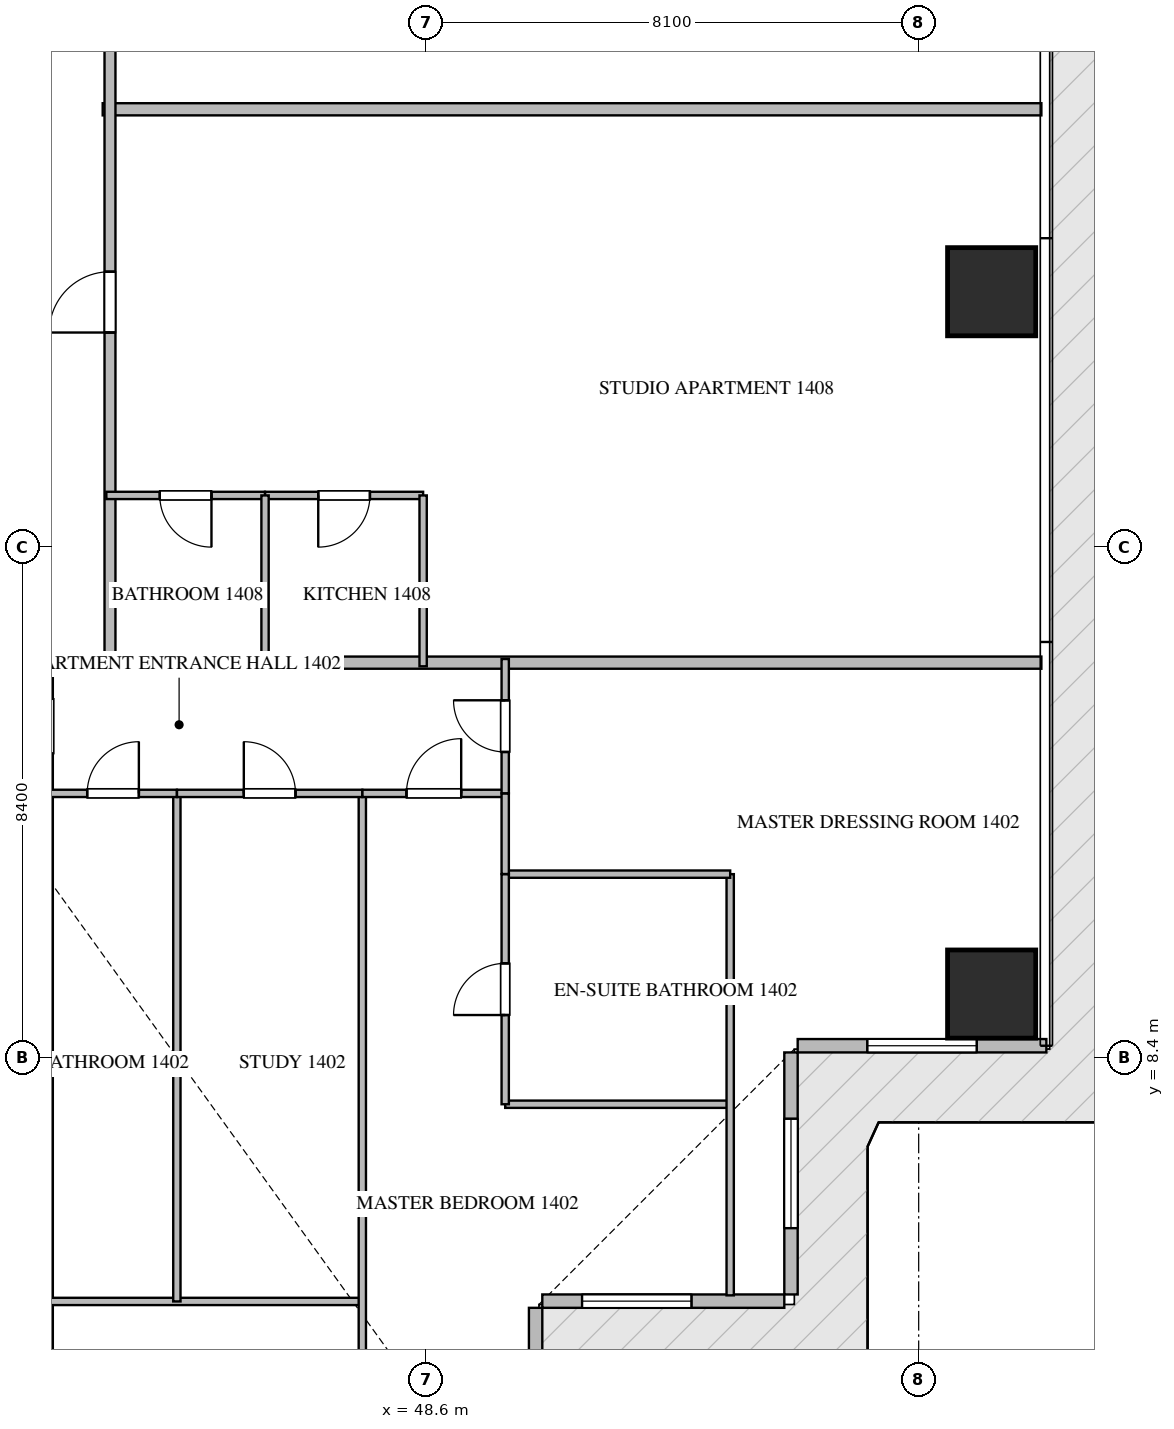
"""IFC4 building model, lengths in metres.
Left out: names, types, materials, properties, quantities, classifications, styles, units other than length and angle.
Written with IfcOpenShell. Run it as: python <this file> out.ifc"""

import sys

from ifc_helpers import new_model, si_unit, direction, frame, frame_2d, origin, origin_2d, place, context, subcontext, project, spatial, rectangle, extrude, source, transform, mapped, element, fill, save


model = new_model("IFC4")
c1 = context("Model", 3, precision=1e-05, world=origin(), true_north=direction((0.0, 1.0)))
c2 = subcontext(c1, "Body", "Model", "MODEL_VIEW")
j1 = project(units=[si_unit("LENGTHUNIT", "METRE"), si_unit("PLANEANGLEUNIT", "RADIAN")], contexts=[c1])
p1 = place(None, origin())
s1 = spatial("IfcSite", under=j1, at=p1, CompositionType="ELEMENT")
p2 = place(p1, origin())
s2 = spatial("IfcBuilding", under=s1, at=p2, CompositionType="ELEMENT")
p3 = place(p2, frame((0.0, 0.0, 60.45)))
s3 = spatial("IfcBuildingStorey", under=s2, at=p3, CompositionType="ELEMENT", Elevation=60.45)
m1 = source(origin(), c2, "Body", "SweptSolid", [
    extrude(rectangle(XDim=1.45, YDim=1.45, at=origin_2d()), origin(), (0.0, 0.0, 1.0), 3.75),
])
for number, where, z_axis, x_axis in (
    (1, (57.9, 9.45, -0.26), (0.0, 0.0, 1.0), (1.0, 0.0, 0.0)),
    (2, (57.9, 21.0, -0.26), (0.0, 0.0, 1.0), (1.0, 0.0, 0.0)),
):
    element("IfcColumn", number, at=place(p3, frame(where, z_axis=z_axis, x_axis=x_axis)), inside=s3, PredefinedType="COLUMN", context=c2, shape_type="MappedRepresentation", body=[
        mapped(m1, transform((0.0, 0.0, 0.0), scale=1.0)),
    ])
p4 = place(p3, frame((50.4, 0.2, 0.0), z_axis=(0.0, 0.0, 1.0), x_axis=(0.0, 1.0, 0.0)))
e3 = element("IfcWall", 3, at=p4, inside=s3, PredefinedType="ELEMENTEDWALL", context=c2, shape_type="SweptSolid", body=[
    extrude(rectangle(XDim=4.09, YDim=0.22, at=frame_2d((2.045, 0.0))), origin(), (0.0, 0.0, 1.0), 3.475),
])
p5 = place(p4, frame((1.145, 0.0, 0.65)))
e4 = element("IfcOpeningElement", 4, at=p5, cuts=e3, PredefinedType="OPENING", context=c2, shape_type="SweptSolid", body=[
    extrude(rectangle(XDim=1.8, YDim=2.1, at=frame_2d((0.9, 1.05))), frame((0.0, 0.12, 0.0), z_axis=(0.0, -1.0, 0.0), x_axis=(1.0, 0.0, 0.0)), (0.0, 0.0, 1.0), 0.24),
])
p6 = place(p3, frame((50.51, 4.4, 0.0), z_axis=(0.0, 0.0, 1.0), x_axis=(1.0, 0.0, 0.0)))
e5 = element("IfcWall", 5, at=p6, inside=s3, PredefinedType="ELEMENTEDWALL", context=c2, shape_type="SweptSolid", body=[
    extrude(rectangle(XDim=3.98, YDim=0.22, at=frame_2d((1.99, 0.0))), origin(), (0.0, 0.0, 1.0), 3.475),
])
p7 = place(p6, frame((0.654, 0.0, 0.65)))
e6 = element("IfcOpeningElement", 6, at=p7, cuts=e5, PredefinedType="OPENING", context=c2, shape_type="SweptSolid", body=[
    extrude(rectangle(XDim=1.8, YDim=2.1, at=frame_2d((0.9, 1.05))), frame((0.0, 0.12, 0.0), z_axis=(0.0, -1.0, 0.0), x_axis=(1.0, 0.0, 0.0)), (0.0, 0.0, 1.0), 0.24),
])
p8 = place(p3, frame((54.6, 4.51, 0.0), z_axis=(0.0, 0.0, 1.0), x_axis=(0.0, 1.0, 0.0)))
e7 = element("IfcWall", 7, at=p8, inside=s3, PredefinedType="ELEMENTEDWALL", context=c2, shape_type="SweptSolid", body=[
    extrude(rectangle(XDim=3.98, YDim=0.22, at=frame_2d((1.99, 0.0))), origin(), (0.0, 0.0, 1.0), 3.475),
])
p9 = place(p8, frame((1.09, 0.0, 0.65)))
e8 = element("IfcOpeningElement", 8, at=p9, cuts=e7, PredefinedType="OPENING", context=c2, shape_type="SweptSolid", body=[
    extrude(rectangle(XDim=1.8, YDim=2.1, at=frame_2d((0.9, 1.05))), frame((0.0, 0.12, 0.0), z_axis=(0.0, -1.0, 0.0), x_axis=(1.0, 0.0, 0.0)), (0.0, 0.0, 1.0), 0.24),
])
p10 = place(p3, frame((54.71, 8.6, 0.0), z_axis=(0.0, 0.0, 1.0), x_axis=(1.0, 0.0, 0.0)))
e9 = element("IfcWall", 9, at=p10, inside=s3, PredefinedType="ELEMENTEDWALL", context=c2, shape_type="SweptSolid", body=[
    extrude(rectangle(XDim=4.09, YDim=0.22, at=frame_2d((2.045, 0.0))), origin(), (0.0, 0.0, 1.0), 3.475),
])
p11 = place(p10, frame((1.145, 0.0, 0.65)))
e10 = element("IfcOpeningElement", 10, at=p11, cuts=e9, PredefinedType="OPENING", context=c2, shape_type="SweptSolid", body=[
    extrude(rectangle(XDim=1.8, YDim=2.1, at=frame_2d((0.9, 1.05))), frame((0.0, 0.12, 0.0), z_axis=(0.0, -1.0, 0.0), x_axis=(1.0, 0.0, 0.0)), (0.0, 0.0, 1.0), 0.24),
])
p12 = place(p3, frame((43.28, 24.0, 0.0), z_axis=(0.0, 0.0, 1.0), x_axis=(1.0, 0.0, 0.0)))
e11 = element("IfcWall", 11, at=p12, inside=s3, PredefinedType="PARTITIONING", context=c2, shape_type="SweptSolid", body=[
    extrude(rectangle(XDim=15.438, YDim=0.2, at=frame_2d((7.719, 0.0))), origin(), (0.0, 0.0, 1.0), 3.49),
])
p13 = place(p3, frame((43.4, 14.9, 0.0), z_axis=(0.0, 0.0, 1.0), x_axis=(1.0, 0.0, 0.0)))
e12 = element("IfcWall", 12, at=p13, inside=s3, PredefinedType="PARTITIONING", context=c2, shape_type="SweptSolid", body=[
    extrude(rectangle(XDim=15.318, YDim=0.2, at=frame_2d((7.659, 0.0))), origin(), (0.0, 0.0, 1.0), 3.49),
])
p14 = place(p3, frame((21.402, 14.9, 0.0), z_axis=(0.0, 0.0, 1.0), x_axis=(1.0, 0.0, 0.0)))
e13 = element("IfcWall", 13, at=p14, inside=s3, PredefinedType="PARTITIONING", context=c2, shape_type="SweptSolid", body=[
    extrude(rectangle(XDim=21.996, YDim=0.18, at=frame_2d((10.998, 0.0))), origin(), (0.0, 0.0, 1.0), 3.49),
])
p15 = place(p14, frame((9.742, 0.0, 0.0)))
e14 = element("IfcOpeningElement", 14, at=p15, cuts=e13, PredefinedType="OPENING", context=c2, shape_type="SweptSolid", body=[
    extrude(rectangle(XDim=1.0, YDim=2.15, at=frame_2d((0.5, 1.075))), frame((0.0, 0.1, 0.0), z_axis=(0.0, -1.0, 0.0), x_axis=(1.0, 0.0, 0.0)), (0.0, 0.0, 1.0), 0.2),
])
p16 = place(p14, frame((14.781, 0.0, 0.0)))
e15 = element("IfcOpeningElement", 15, at=p16, cuts=e13, PredefinedType="OPENING", context=c2, shape_type="SweptSolid", body=[
    extrude(rectangle(XDim=1.0, YDim=2.15, at=frame_2d((0.5, 1.075))), frame((0.0, 0.1, 0.0), z_axis=(0.0, -1.0, 0.0), x_axis=(1.0, 0.0, 0.0)), (0.0, 0.0, 1.0), 0.2),
])
p17 = place(p3, frame((43.4, 14.9, 0.0), z_axis=(0.0, 0.0, 1.0), x_axis=(0.0, 1.0, 0.0)))
e16 = element("IfcWall", 16, at=p17, inside=s3, PredefinedType="PARTITIONING", context=c2, shape_type="SweptSolid", body=[
    extrude(rectangle(XDim=20.6, YDim=0.18, at=frame_2d((10.3, 0.0))), origin(), (0.0, 0.0, 1.0), 3.49),
])
p18 = place(p17, frame((5.429, 0.0, 0.0)))
e17 = element("IfcOpeningElement", 17, at=p18, cuts=e16, PredefinedType="OPENING", context=c2, shape_type="SweptSolid", body=[
    extrude(rectangle(XDim=1.0, YDim=2.15, at=frame_2d((0.5, 1.075))), frame((0.0, 0.1, 0.0), z_axis=(0.0, -1.0, 0.0), x_axis=(1.0, 0.0, 0.0)), (0.0, 0.0, 1.0), 0.2),
])
p19 = place(p17, frame((10.506, 0.0, 0.0)))
e18 = element("IfcOpeningElement", 18, at=p19, cuts=e16, PredefinedType="OPENING", context=c2, shape_type="SweptSolid", body=[
    extrude(rectangle(XDim=1.0, YDim=2.15, at=frame_2d((0.5, 1.075))), frame((0.0, 0.1, 0.0), z_axis=(0.0, -1.0, 0.0), x_axis=(1.0, 0.0, 0.0)), (0.0, 0.0, 1.0), 0.2),
])
p20 = place(p3, frame((42.4, 12.75, 0.0), z_axis=(0.0, 0.0, 1.0), x_axis=(0.0, 1.0, 0.0)))
e19 = element("IfcWall", 19, at=p20, inside=s3, PredefinedType="PARTITIONING", context=c2, shape_type="SweptSolid", body=[
    extrude(rectangle(XDim=2.21, YDim=0.12, at=frame_2d((1.105, 0.0))), origin(), (0.0, 0.0, 1.0), 3.49),
])
p21 = place(p20, frame((0.655, 0.0, 0.0)))
e20 = element("IfcOpeningElement", 20, at=p21, cuts=e19, PredefinedType="OPENING", context=c2, shape_type="SweptSolid", body=[
    extrude(rectangle(XDim=0.9, YDim=2.1, at=frame_2d((0.45, 1.05))), frame((0.0, 0.07, 0.0), z_axis=(0.0, -1.0, 0.0), x_axis=(1.0, 0.0, 0.0)), (0.0, 0.0, 1.0), 0.14),
])
p22 = place(p3, frame((42.4, 0.295, 0.0), z_axis=(0.0, 0.0, 1.0), x_axis=(0.0, 1.0, 0.0)))
e21 = element("IfcWall", 21, at=p22, inside=s3, PredefinedType="PARTITIONING", context=c2, shape_type="SweptSolid", body=[
    extrude(rectangle(XDim=4.1, YDim=0.12, at=frame_2d((2.05, 0.0))), origin(), (0.0, 0.0, 1.0), 3.49),
])
p23 = place(p22, frame((1.76, 0.0, 0.0)))
e22 = element("IfcOpeningElement", 22, at=p23, cuts=e21, PredefinedType="OPENING", context=c2, shape_type="SweptSolid", body=[
    extrude(rectangle(XDim=0.9, YDim=2.1, at=frame_2d((0.45, 1.05))), frame((0.0, 0.07, 0.0), z_axis=(0.0, -1.0, 0.0), x_axis=(1.0, 0.0, 0.0)), (0.0, 0.0, 1.0), 0.14),
])
p24 = place(p3, frame((42.4, 4.397, 0.0), z_axis=(0.0, 0.0, 1.0), x_axis=(0.0, 1.0, 0.0)))
e23 = element("IfcWall", 23, at=p24, inside=s3, PredefinedType="PARTITIONING", context=c2, shape_type="SweptSolid", body=[
    extrude(rectangle(XDim=8.351, YDim=0.12, at=frame_2d((4.176, 0.0))), origin(), (0.0, 0.0, 1.0), 3.49),
])
p25 = place(p3, frame((42.4, 4.395, 0.0), z_axis=(0.0, 0.0, 1.0), x_axis=(1.0, 0.0, 0.0)))
e24 = element("IfcWall", 24, at=p25, inside=s3, PredefinedType="PARTITIONING", context=c2, shape_type="SweptSolid", body=[
    extrude(rectangle(XDim=5.15, YDim=0.12, at=frame_2d((2.575, 0.0))), origin(), (0.0, 0.0, 1.0), 3.49),
])
p26 = place(p3, frame((47.55, 0.295, 0.0), z_axis=(0.0, 0.0, 1.0), x_axis=(0.0, 1.0, 0.0)))
e25 = element("IfcWall", 25, at=p26, inside=s3, PredefinedType="PARTITIONING", context=c2, shape_type="SweptSolid", body=[
    extrude(rectangle(XDim=12.455, YDim=0.12, at=frame_2d((6.228, 0.0))), origin(), (0.0, 0.0, 1.0), 3.49),
])
p27 = place(p3, frame((44.5, 4.395, 0.0), z_axis=(0.0, 0.0, 1.0), x_axis=(0.0, 1.0, 0.0)))
e26 = element("IfcWall", 26, at=p27, inside=s3, PredefinedType="PARTITIONING", context=c2, shape_type="SweptSolid", body=[
    extrude(rectangle(XDim=8.355, YDim=0.12, at=frame_2d((4.177, 0.0))), origin(), (0.0, 0.0, 1.0), 3.49),
])
p28 = place(p3, frame((42.4, 12.75, 0.0), z_axis=(0.0, 0.0, 1.0), x_axis=(1.0, 0.0, 0.0)))
e27 = element("IfcWall", 27, at=p28, inside=s3, PredefinedType="PARTITIONING", context=c2, shape_type="SweptSolid", body=[
    extrude(rectangle(XDim=2.1, YDim=0.12, at=frame_2d((1.05, 0.0))), origin(), (0.0, 0.0, 1.0), 3.49),
])
p29 = place(p28, frame((0.625, 0.0, 0.0)))
e28 = element("IfcOpeningElement", 28, at=p29, cuts=e27, PredefinedType="OPENING", context=c2, shape_type="SweptSolid", body=[
    extrude(rectangle(XDim=0.85, YDim=2.1, at=frame_2d((0.425, 1.05))), frame((0.0, 0.07, 0.0), z_axis=(0.0, -1.0, 0.0), x_axis=(1.0, 0.0, 0.0)), (0.0, 0.0, 1.0), 0.14),
])
p30 = place(p3, frame((44.502, 12.75, 0.0), z_axis=(0.0, 0.0, 1.0), x_axis=(1.0, 0.0, 0.0)))
e29 = element("IfcWall", 29, at=p30, inside=s3, PredefinedType="PARTITIONING", context=c2, shape_type="SweptSolid", body=[
    extrude(rectangle(XDim=3.048, YDim=0.12, at=frame_2d((1.524, 0.0))), origin(), (0.0, 0.0, 1.0), 3.49),
])
p31 = place(p30, frame((1.099, 0.0, 0.0)))
e30 = element("IfcOpeningElement", 30, at=p31, cuts=e29, PredefinedType="OPENING", context=c2, shape_type="SweptSolid", body=[
    extrude(rectangle(XDim=0.85, YDim=2.1, at=frame_2d((0.425, 1.05))), frame((0.0, 0.07, 0.0), z_axis=(0.0, -1.0, 0.0), x_axis=(1.0, 0.0, 0.0)), (0.0, 0.0, 1.0), 0.14),
])
p32 = place(p3, frame((47.552, 12.75, 0.0), z_axis=(0.0, 0.0, 1.0), x_axis=(1.0, 0.0, 0.0)))
e31 = element("IfcWall", 31, at=p32, inside=s3, PredefinedType="PARTITIONING", context=c2, shape_type="SweptSolid", body=[
    extrude(rectangle(XDim=2.348, YDim=0.12, at=frame_2d((1.174, 0.0))), origin(), (0.0, 0.0, 1.0), 3.49),
])
p33 = place(p32, frame((0.724, 0.0, 0.0)))
e32 = element("IfcOpeningElement", 32, at=p33, cuts=e31, PredefinedType="OPENING", context=c2, shape_type="SweptSolid", body=[
    extrude(rectangle(XDim=0.9, YDim=2.1, at=frame_2d((0.45, 1.05))), frame((0.0, 0.07, 0.0), z_axis=(0.0, -1.0, 0.0), x_axis=(1.0, 0.0, 0.0)), (0.0, 0.0, 1.0), 0.14),
])
p34 = place(p3, frame((49.9, 7.638, 0.0), z_axis=(0.0, 0.0, 1.0), x_axis=(1.0, 0.0, 0.0)))
e33 = element("IfcWall", 33, at=p34, inside=s3, PredefinedType="PARTITIONING", context=c2, shape_type="SweptSolid", body=[
    extrude(rectangle(XDim=3.7, YDim=0.12, at=frame_2d((1.85, 0.0))), origin(), (0.0, 0.0, 1.0), 3.49),
])
p35 = place(p3, frame((53.6, 4.495, 0.0), z_axis=(0.0, 0.0, 1.0), x_axis=(0.0, 1.0, 0.0)))
e34 = element("IfcWall", 34, at=p35, inside=s3, PredefinedType="PARTITIONING", context=c2, shape_type="SweptSolid", body=[
    extrude(rectangle(XDim=6.927, YDim=0.12, at=frame_2d((3.463, 0.0))), origin(), (0.0, 0.0, 1.0), 3.49),
])
p36 = place(p3, frame((49.9, 11.422, 0.0), z_axis=(0.0, 0.0, 1.0), x_axis=(1.0, 0.0, 0.0)))
e35 = element("IfcWall", 35, at=p36, inside=s3, PredefinedType="PARTITIONING", context=c2, shape_type="SweptSolid", body=[
    extrude(rectangle(XDim=3.7, YDim=0.12, at=frame_2d((1.85, 0.0))), origin(), (0.0, 0.0, 1.0), 3.49),
])
p37 = place(p3, frame((49.9, 7.638, 0.0), z_axis=(0.0, 0.0, 1.0), x_axis=(0.0, 1.0, 0.0)))
e36 = element("IfcWall", 36, at=p37, inside=s3, PredefinedType="PARTITIONING", context=c2, shape_type="SweptSolid", body=[
    extrude(rectangle(XDim=3.784, YDim=0.12, at=frame_2d((1.892, 0.0))), origin(), (0.0, 0.0, 1.0), 3.49),
])
p38 = place(p37, frame((1.467, 0.0, 0.0)))
e37 = element("IfcOpeningElement", 37, at=p38, cuts=e36, PredefinedType="OPENING", context=c2, shape_type="SweptSolid", body=[
    extrude(rectangle(XDim=0.85, YDim=2.1, at=frame_2d((0.425, 1.05))), frame((0.0, 0.07, 0.0), z_axis=(0.0, -1.0, 0.0), x_axis=(1.0, 0.0, 0.0)), (0.0, 0.0, 1.0), 0.14),
])
p39 = place(p3, frame((49.9, 11.424, 0.0), z_axis=(0.0, 0.0, 1.0), x_axis=(0.0, 1.0, 0.0)))
e38 = element("IfcWall", 38, at=p39, inside=s3, PredefinedType="PARTITIONING", context=c2, shape_type="SweptSolid", body=[
    extrude(rectangle(XDim=1.326, YDim=0.12, at=frame_2d((0.663, 0.0))), origin(), (0.0, 0.0, 1.0), 3.49),
])
p40 = place(p3, frame((49.9, 12.752, 0.0), z_axis=(0.0, 0.0, 1.0), x_axis=(0.0, 1.0, 0.0)))
e39 = element("IfcWall", 39, at=p40, inside=s3, PredefinedType="PARTITIONING", context=c2, shape_type="SweptSolid", body=[
    extrude(rectangle(XDim=2.208, YDim=0.12, at=frame_2d((1.104, 0.0))), origin(), (0.0, 0.0, 1.0), 3.49),
])
p41 = place(p40, frame((0.679, 0.0, 0.0)))
e40 = element("IfcOpeningElement", 40, at=p41, cuts=e39, PredefinedType="OPENING", context=c2, shape_type="SweptSolid", body=[
    extrude(rectangle(XDim=0.85, YDim=2.1, at=frame_2d((0.425, 1.05))), frame((0.0, 0.07, 0.0), z_axis=(0.0, -1.0, 0.0), x_axis=(1.0, 0.0, 0.0)), (0.0, 0.0, 1.0), 0.14),
])
p42 = place(p3, frame((48.55, 17.65, 0.0), z_axis=(0.0, 0.0, 1.0), x_axis=(-1.0, 0.0, 0.0)))
e41 = element("IfcWall", 41, at=p42, inside=s3, PredefinedType="PARTITIONING", context=c2, shape_type="SweptSolid", body=[
    extrude(rectangle(XDim=2.6, YDim=0.12, at=frame_2d((1.3, 0.0))), origin(), (0.0, 0.0, 1.0), 3.49),
])
p43 = place(p42, frame((0.875, 0.0, 0.0)))
e42 = element("IfcOpeningElement", 42, at=p43, cuts=e41, PredefinedType="OPENING", context=c2, shape_type="SweptSolid", body=[
    extrude(rectangle(XDim=0.85, YDim=2.1, at=frame_2d((0.425, 1.05))), frame((0.0, 0.07, 0.0), z_axis=(0.0, -1.0, 0.0), x_axis=(1.0, 0.0, 0.0)), (0.0, 0.0, 1.0), 0.14),
])
p44 = place(p3, frame((45.948, 17.65, 0.0), z_axis=(0.0, 0.0, 1.0), x_axis=(-1.0, 0.0, 0.0)))
e43 = element("IfcWall", 43, at=p44, inside=s3, PredefinedType="PARTITIONING", context=c2, shape_type="SweptSolid", body=[
    extrude(rectangle(XDim=2.608, YDim=0.12, at=frame_2d((1.304, 0.0))), origin(), (0.0, 0.0, 1.0), 3.49),
])
p45 = place(p44, frame((0.879, 0.0, 0.0)))
e44 = element("IfcOpeningElement", 44, at=p45, cuts=e43, PredefinedType="OPENING", context=c2, shape_type="SweptSolid", body=[
    extrude(rectangle(XDim=0.85, YDim=2.1, at=frame_2d((0.425, 1.05))), frame((0.0, 0.07, 0.0), z_axis=(0.0, -1.0, 0.0), x_axis=(1.0, 0.0, 0.0)), (0.0, 0.0, 1.0), 0.14),
])
for number, where, z_axis, x_axis in (
    (45, (45.95, 14.84, 0.0), (0.0, 0.0, 1.0), (0.0, 1.0, 0.0)),
    (46, (48.55, 14.84, 0.0), (0.0, 0.0, 1.0), (0.0, 1.0, 0.0)),
):
    element("IfcWall", number, at=place(p3, frame(where, z_axis=z_axis, x_axis=x_axis)), inside=s3, PredefinedType="PARTITIONING", context=c2, shape_type="SweptSolid", body=[
        extrude(rectangle(XDim=2.81, YDim=0.12, at=frame_2d((1.405, 0.0))), origin(), (0.0, 0.0, 1.0), 3.49),
    ])
m2 = source(origin(), c2, "Body", "SweptSolid", [
    extrude(rectangle(XDim=1.8, YDim=2.1, at=frame_2d((0.9, 1.05))), frame((0.0, 0.03, 0.0), z_axis=(0.0, -1.0, 0.0), x_axis=(1.0, 0.0, 0.0)), (0.0, 0.0, 1.0), 0.06),
])
p46 = place(p7, origin())
e47 = element("IfcWindow", 47, at=p46, inside=s3, PartitioningType="SINGLE_PANEL", PredefinedType="WINDOW", context=c2, shape_type="MappedRepresentation", body=[
    mapped(m2, transform((0.0, 0.0, 0.0), scale=1.0)),
])
fill(e6, e47)
p47 = place(p9, origin())
e48 = element("IfcWindow", 48, at=p47, inside=s3, PartitioningType="SINGLE_PANEL", PredefinedType="WINDOW", context=c2, shape_type="MappedRepresentation", body=[
    mapped(m2, transform((0.0, 0.0, 0.0), scale=1.0)),
])
fill(e8, e48)
p48 = place(p11, origin())
e49 = element("IfcWindow", 49, at=p48, inside=s3, PartitioningType="SINGLE_PANEL", PredefinedType="WINDOW", context=c2, shape_type="MappedRepresentation", body=[
    mapped(m2, transform((0.0, 0.0, 0.0), scale=1.0)),
])
fill(e10, e49)
m3 = source(origin(), c2, "Body", "SweptSolid", [
    extrude(rectangle(XDim=1.0, YDim=2.15, at=frame_2d((0.5, 1.075))), frame((0.0, 0.025, 0.0), z_axis=(0.0, -1.0, 0.0), x_axis=(1.0, 0.0, 0.0)), (0.0, 0.0, 1.0), 0.05),
])
p49 = place(p18, origin())
e50 = element("IfcDoor", 50, at=p49, inside=s3, OperationType="SINGLE_SWING_LEFT", PredefinedType="DOOR", context=c2, shape_type="MappedRepresentation", body=[
    mapped(m3, transform((0.0, 0.0, 0.0), scale=1.0)),
])
fill(e17, e50)
m4 = source(origin(), c2, "Body", "SweptSolid", [
    extrude(rectangle(XDim=0.85, YDim=2.1, at=frame_2d((0.425, 1.05))), frame((0.0, 0.025, 0.0), z_axis=(0.0, -1.0, 0.0), x_axis=(1.0, 0.0, 0.0)), (0.0, 0.0, 1.0), 0.05),
])
p50 = place(p29, origin())
e51 = element("IfcDoor", 51, at=p50, inside=s3, OperationType="SINGLE_SWING_RIGHT", PredefinedType="DOOR", context=c2, shape_type="MappedRepresentation", body=[
    mapped(m4, transform((0.0, 0.0, 0.0), scale=1.0)),
])
fill(e28, e51)
p51 = place(p31, origin())
e52 = element("IfcDoor", 52, at=p51, inside=s3, OperationType="SINGLE_SWING_LEFT", PredefinedType="DOOR", context=c2, shape_type="MappedRepresentation", body=[
    mapped(m4, transform((0.0, 0.0, 0.0), scale=1.0)),
])
fill(e30, e52)
m5 = source(origin(), c2, "Body", "SweptSolid", [
    extrude(rectangle(XDim=0.9, YDim=2.1, at=frame_2d((0.45, 1.05))), frame((0.0, 0.025, 0.0), z_axis=(0.0, -1.0, 0.0), x_axis=(1.0, 0.0, 0.0)), (0.0, 0.0, 1.0), 0.05),
])
p52 = place(p33, origin())
e53 = element("IfcDoor", 53, at=p52, inside=s3, OperationType="SINGLE_SWING_RIGHT", PredefinedType="DOOR", context=c2, shape_type="MappedRepresentation", body=[
    mapped(m5, transform((0.0, 0.0, 0.0), scale=1.0)),
])
fill(e32, e53)
p53 = place(p38, origin())
e54 = element("IfcDoor", 54, at=p53, inside=s3, OperationType="SINGLE_SWING_LEFT", PredefinedType="DOOR", context=c2, shape_type="MappedRepresentation", body=[
    mapped(m4, transform((0.0, 0.0, 0.0), scale=1.0)),
])
fill(e37, e54)
p54 = place(p41, origin())
e55 = element("IfcDoor", 55, at=p54, inside=s3, OperationType="SINGLE_SWING_RIGHT", PredefinedType="DOOR", context=c2, shape_type="MappedRepresentation", body=[
    mapped(m4, transform((0.0, 0.0, 0.0), scale=1.0)),
])
fill(e40, e55)
p55 = place(p43, origin())
e56 = element("IfcDoor", 56, at=p55, inside=s3, OperationType="SINGLE_SWING_RIGHT", PredefinedType="DOOR", context=c2, shape_type="MappedRepresentation", body=[
    mapped(m4, transform((0.0, 0.0, 0.0), scale=1.0)),
])
fill(e42, e56)
p56 = place(p45, origin())
e57 = element("IfcDoor", 57, at=p56, inside=s3, OperationType="SINGLE_SWING_LEFT", PredefinedType="DOOR", context=c2, shape_type="MappedRepresentation", body=[
    mapped(m4, transform((0.0, 0.0, 0.0), scale=1.0)),
])
fill(e44, e57)
save(model, sys.argv[1])
